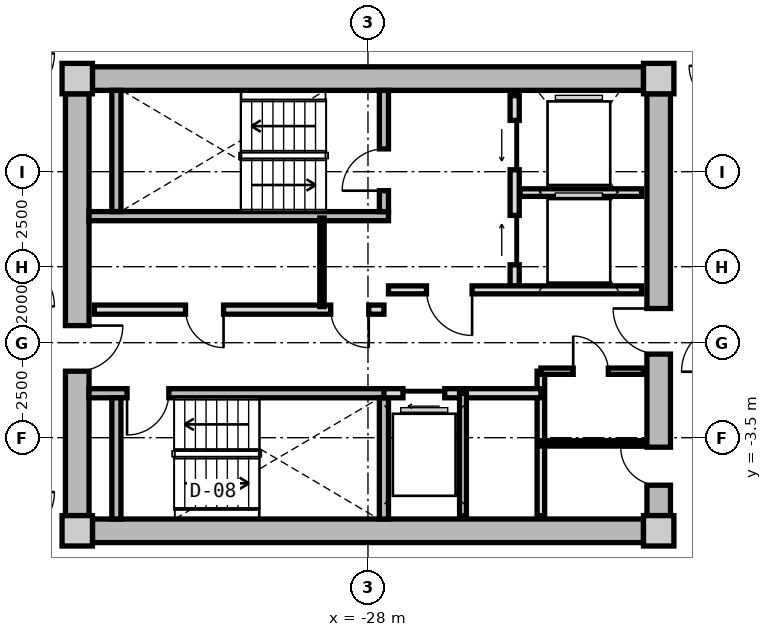
"""IFC4 building model, lengths in metres.
Left out: names, types, materials, properties, quantities, classifications, styles, units other than length and angle.
Written with IfcOpenShell. Run it as: python <this file> out.ifc"""

import sys

from ifc_helpers import new_model, si_unit, direction, frame, frame_2d, origin, origin_2d, place, context, subcontext, project, spatial, rectangle, extrude, source, transform, mapped, element, fill, save


model = new_model("IFC4")
c1 = context("Model", 3, precision=1e-05, world=origin(), true_north=direction((0.0, 1.0)))
c2 = subcontext(c1, "Body", "Model", "MODEL_VIEW")
j1 = project(units=[si_unit("LENGTHUNIT", "METRE"), si_unit("PLANEANGLEUNIT", "RADIAN")], contexts=[c1])
p1 = place(None, origin())
s1 = spatial("IfcSite", under=j1, at=p1, CompositionType="ELEMENT")
p2 = place(p1, origin())
s2 = spatial("IfcBuilding", under=s1, at=p2, CompositionType="ELEMENT")
p3 = place(p2, frame((0.0, 0.0, 152.6)))
s3 = spatial("IfcBuildingStorey", under=s2, at=p3, CompositionType="ELEMENT", Elevation=152.6)
m1 = source(origin(), c2, "Body", "SweptSolid", [
    extrude(rectangle(XDim=0.8, YDim=0.8, at=origin_2d()), origin(), (0.0, 0.0, 1.0), 3.05),
])
for number, where, z_axis, x_axis in (
    (1, (-35.65, -5.95, 0.0), (0.0, 0.0, 1.0), (1.0, 0.0, 0.0)),
    (2, (-20.35, -5.95, 0.0), (0.0, 0.0, 1.0), (1.0, 0.0, 0.0)),
    (3, (-20.35, 5.95, 0.0), (0.0, 0.0, 1.0), (1.0, 0.0, 0.0)),
    (4, (-35.65, 5.95, 0.0), (0.0, 0.0, 1.0), (1.0, 0.0, 0.0)),
):
    element("IfcColumn", number, at=place(p3, frame(where, z_axis=z_axis, x_axis=x_axis)), inside=s3, PredefinedType="COLUMN", context=c2, shape_type="MappedRepresentation", body=[
        mapped(m1, transform((0.0, 0.0, 0.0), x_axis=(1.0, 0.0, 0.0), y_axis=(0.0, 1.0, 0.0), z_axis=(0.0, 0.0, 1.0), scale=1.0)),
    ])
m2 = source(origin(), c2, "Body", "SweptSolid", [
    extrude(rectangle(XDim=14.5, YDim=0.62, at=frame_2d((7.25, 0.0))), origin(), (0.0, 0.0, 1.0), 2.81),
])
for number, where, z_axis, x_axis in (
    (5, (-35.25, 5.95, 0.0), (0.0, 0.0, 1.0), (1.0, 0.0, 0.0)),
    (6, (-20.75, -5.95, 0.0), (0.0, 0.0, 1.0), (-1.0, 0.0, 0.0)),
):
    element("IfcWall", number, at=place(p3, frame(where, z_axis=z_axis, x_axis=x_axis)), inside=s3, PredefinedType="SHEAR", context=c2, shape_type="MappedRepresentation", body=[
        mapped(m2, transform((0.0, 0.0, 0.0), x_axis=(1.0, 0.0, 0.0), y_axis=(0.0, 1.0, 0.0), z_axis=(0.0, 0.0, 1.0), scale=1.0)),
    ])
m3 = source(origin(), c2, "Body", "SweptSolid", [
    extrude(rectangle(XDim=11.1, YDim=0.62, at=frame_2d((5.55, 0.0))), origin(), (0.0, 0.0, 1.0), 2.81),
])
p4 = place(p3, frame((-35.65, -5.55, 0.0), z_axis=(0.0, 0.0, 1.0), x_axis=(0.0, 1.0, 0.0)))
e7 = element("IfcWall", 7, at=p4, inside=s3, PredefinedType="SHEAR", context=c2, shape_type="MappedRepresentation", body=[
    mapped(m3, transform((0.0, 0.0, 0.0), x_axis=(1.0, 0.0, 0.0), y_axis=(0.0, 1.0, 0.0), z_axis=(0.0, 0.0, 1.0), scale=1.0)),
])
p5 = place(p4, frame((3.8, 0.0, 0.0)))
e8 = element("IfcOpeningElement", 8, at=p5, cuts=e7, PredefinedType="OPENING", context=c2, shape_type="SweptSolid", body=[
    extrude(rectangle(XDim=1.2, YDim=2.15, at=frame_2d((0.6, 1.075))), frame((0.0, 0.32, 0.0), z_axis=(0.0, -1.0, 0.0), x_axis=(1.0, 0.0, 0.0)), (0.0, 0.0, 1.0), 0.64),
])
p6 = place(p3, frame((-20.35, 5.55, 0.0), z_axis=(0.0, 0.0, 1.0), x_axis=(0.0, -1.0, 0.0)))
e9 = element("IfcWall", 9, at=p6, inside=s3, PredefinedType="SHEAR", context=c2, shape_type="MappedRepresentation", body=[
    mapped(m3, transform((0.0, 0.0, 0.0), x_axis=(1.0, 0.0, 0.0), y_axis=(0.0, 1.0, 0.0), z_axis=(0.0, 0.0, 1.0), scale=1.0)),
])
p7 = place(p6, frame((5.65, 0.0, 0.0)))
e10 = element("IfcOpeningElement", 10, at=p7, cuts=e9, PredefinedType="OPENING", context=c2, shape_type="SweptSolid", body=[
    extrude(rectangle(XDim=1.2, YDim=2.15, at=frame_2d((0.6, 1.075))), frame((0.0, 0.32, 0.0), z_axis=(0.0, -1.0, 0.0), x_axis=(1.0, 0.0, 0.0)), (0.0, 0.0, 1.0), 0.64),
])
p8 = place(p6, frame((9.3, 0.0, 0.0)))
e11 = element("IfcOpeningElement", 11, at=p8, cuts=e9, PredefinedType="OPENING", context=c2, shape_type="SweptSolid", body=[
    extrude(rectangle(XDim=1.0, YDim=2.1, at=frame_2d((0.5, 1.05))), frame((0.0, 0.32, 0.0), z_axis=(0.0, -1.0, 0.0), x_axis=(1.0, 0.0, 0.0)), (0.0, 0.0, 1.0), 0.64),
])
m4 = source(origin(), c2, "Body", "SweptSolid", [
    extrude(rectangle(XDim=7.88, YDim=0.24, at=frame_2d((3.94, 0.0))), origin(), (0.0, 0.0, 1.0), 2.81),
])
p9 = place(p3, frame((-35.34, 2.33, 0.0), z_axis=(0.0, 0.0, 1.0), x_axis=(1.0, 0.0, 0.0)))
e12 = element("IfcWall", 12, at=p9, inside=s3, PredefinedType="PARTITIONING", context=c2, shape_type="MappedRepresentation", body=[
    mapped(m4, transform((0.0, 0.0, 0.0), x_axis=(1.0, 0.0, 0.0), y_axis=(0.0, 1.0, 0.0), z_axis=(0.0, 0.0, 1.0), scale=1.0)),
])
m5 = source(origin(), c2, "Body", "SweptSolid", [
    extrude(rectangle(XDim=3.19, YDim=0.24, at=frame_2d((1.595, 0.0))), origin(), (0.0, 0.0, 1.0), 2.81),
])
p10 = place(p3, frame((-34.62, 2.45, 0.0), z_axis=(0.0, 0.0, 1.0), x_axis=(0.0, 1.0, 0.0)))
e13 = element("IfcWall", 13, at=p10, inside=s3, PredefinedType="PARTITIONING", context=c2, shape_type="MappedRepresentation", body=[
    mapped(m5, transform((0.0, 0.0, 0.0), x_axis=(1.0, 0.0, 0.0), y_axis=(0.0, 1.0, 0.0), z_axis=(0.0, 0.0, 1.0), scale=1.0)),
])
p11 = place(p3, frame((-27.58, 2.45, 0.0), z_axis=(0.0, 0.0, 1.0), x_axis=(0.0, 1.0, 0.0)))
e14 = element("IfcWall", 14, at=p11, inside=s3, PredefinedType="PARTITIONING", context=c2, shape_type="MappedRepresentation", body=[
    mapped(m5, transform((0.0, 0.0, 0.0), x_axis=(1.0, 0.0, 0.0), y_axis=(0.0, 1.0, 0.0), z_axis=(0.0, 0.0, 1.0), scale=1.0)),
])
p12 = place(p11, frame((0.55, 0.0, 0.0)))
e15 = element("IfcOpeningElement", 15, at=p12, cuts=e14, PredefinedType="OPENING", context=c2, shape_type="SweptSolid", body=[
    extrude(rectangle(XDim=1.1, YDim=2.15, at=frame_2d((0.55, 1.075))), frame((0.0, 0.13, 0.0), z_axis=(0.0, -1.0, 0.0), x_axis=(1.0, 0.0, 0.0)), (0.0, 0.0, 1.0), 0.26),
])
p13 = place(p3, frame((-35.34, -2.33, 0.0), z_axis=(0.0, 0.0, 1.0), x_axis=(1.0, 0.0, 0.0)))
e16 = element("IfcWall", 16, at=p13, inside=s3, PredefinedType="PARTITIONING", context=c2, shape_type="MappedRepresentation", body=[
    mapped(m4, transform((0.0, 0.0, 0.0), x_axis=(1.0, 0.0, 0.0), y_axis=(0.0, 1.0, 0.0), z_axis=(0.0, 0.0, 1.0), scale=1.0)),
])
p14 = place(p13, frame((1.0, 0.0, 0.0)))
e17 = element("IfcOpeningElement", 17, at=p14, cuts=e16, PredefinedType="OPENING", context=c2, shape_type="SweptSolid", body=[
    extrude(rectangle(XDim=1.1, YDim=2.15, at=frame_2d((0.55, 1.075))), frame((0.0, 0.13, 0.0), z_axis=(0.0, -1.0, 0.0), x_axis=(1.0, 0.0, 0.0)), (0.0, 0.0, 1.0), 0.26),
])
for number, where, z_axis, x_axis in (
    (18, (-34.62, -5.64, 0.0), (0.0, 0.0, 1.0), (0.0, 1.0, 0.0)),
    (19, (-27.58, -5.64, 0.0), (0.0, 0.0, 1.0), (0.0, 1.0, 0.0)),
):
    element("IfcWall", number, at=place(p3, frame(where, z_axis=z_axis, x_axis=x_axis)), inside=s3, PredefinedType="PARTITIONING", context=c2, shape_type="MappedRepresentation", body=[
        mapped(m5, transform((0.0, 0.0, 0.0), x_axis=(1.0, 0.0, 0.0), y_axis=(0.0, 1.0, 0.0), z_axis=(0.0, 0.0, 1.0), scale=1.0)),
    ])
m6 = source(origin(), c2, "Body", "SweptSolid", [
    extrude(rectangle(XDim=5.0, YDim=0.24, at=frame_2d((2.5, 0.0))), origin(), (0.0, 0.0, 1.0), 2.795),
])
p15 = place(p3, frame((-24.14, 0.5, 0.0), z_axis=(0.0, 0.0, 1.0), x_axis=(0.0, 1.0, 0.0)))
e20 = element("IfcWall", 20, at=p15, inside=s3, PredefinedType="PARTITIONING", context=c2, shape_type="MappedRepresentation", body=[
    mapped(m6, transform((0.0, 0.0, 0.0), x_axis=(1.0, 0.0, 0.0), y_axis=(0.0, 1.0, 0.0), z_axis=(0.0, 0.0, 1.0), scale=1.0)),
])
p16 = place(p15, frame((3.05, 0.0, 0.0)))
e21 = element("IfcOpeningElement", 21, at=p16, cuts=e20, PredefinedType="OPENING", context=c2, shape_type="SweptSolid", body=[
    extrude(rectangle(XDim=1.3, YDim=2.2, at=frame_2d((0.65, 1.1))), frame((0.0, 0.13, 0.0), z_axis=(0.0, -1.0, 0.0), x_axis=(1.0, 0.0, 0.0)), (0.0, 0.0, 1.0), 0.26),
])
p17 = place(p15, frame((0.55, 0.0, 0.0)))
e22 = element("IfcOpeningElement", 22, at=p17, cuts=e20, PredefinedType="OPENING", context=c2, shape_type="SweptSolid", body=[
    extrude(rectangle(XDim=1.3, YDim=2.2, at=frame_2d((0.65, 1.1))), frame((0.0, 0.13, 0.0), z_axis=(0.0, -1.0, 0.0), x_axis=(1.0, 0.0, 0.0)), (0.0, 0.0, 1.0), 0.26),
])
m7 = source(origin(), c2, "Body", "SweptSolid", [
    extrude(rectangle(XDim=3.2, YDim=0.2, at=frame_2d((1.6, 0.0))), origin(), (0.0, 0.0, 1.0), 2.795),
])
p18 = place(p3, frame((-24.0, 2.95, 0.0), z_axis=(0.0, 0.0, 1.0), x_axis=(1.0, 0.0, 0.0)))
e23 = element("IfcWall", 23, at=p18, inside=s3, PredefinedType="PARTITIONING", context=c2, shape_type="MappedRepresentation", body=[
    mapped(m7, transform((0.0, 0.0, 0.0), x_axis=(1.0, 0.0, 0.0), y_axis=(0.0, 1.0, 0.0), z_axis=(0.0, 0.0, 1.0), scale=1.0)),
])
m8 = source(origin(), c2, "Body", "SweptSolid", [
    extrude(rectangle(XDim=6.66, YDim=0.21, at=frame_2d((3.33, 0.0))), origin(), (0.0, 0.0, 1.0), 2.795),
])
p19 = place(p3, frame((-27.46, 0.39, 0.0), z_axis=(0.0, 0.0, 1.0), x_axis=(1.0, 0.0, 0.0)))
e24 = element("IfcWall", 24, at=p19, inside=s3, PredefinedType="PARTITIONING", context=c2, shape_type="MappedRepresentation", body=[
    mapped(m8, transform((0.0, 0.0, 0.0), x_axis=(1.0, 0.0, 0.0), y_axis=(0.0, 1.0, 0.0), z_axis=(0.0, 0.0, 1.0), scale=1.0)),
])
p20 = place(p19, frame((1.0, 0.0, 0.0)))
e25 = element("IfcOpeningElement", 25, at=p20, cuts=e24, PredefinedType="OPENING", context=c2, shape_type="SweptSolid", body=[
    extrude(rectangle(XDim=1.2, YDim=2.15, at=frame_2d((0.6, 1.075))), frame((0.0, 0.115, 0.0), z_axis=(0.0, -1.0, 0.0), x_axis=(1.0, 0.0, 0.0)), (0.0, 0.0, 1.0), 0.23),
])
m9 = source(origin(), c2, "Body", "SweptSolid", [
    extrude(rectangle(XDim=7.62, YDim=0.24, at=frame_2d((3.81, 0.0))), origin(), (0.0, 0.0, 1.0), 2.795),
])
p21 = place(p3, frame((-35.2, -0.13, 0.0), z_axis=(0.0, 0.0, 1.0), x_axis=(1.0, 0.0, 0.0)))
e26 = element("IfcWall", 26, at=p21, inside=s3, PredefinedType="PARTITIONING", context=c2, shape_type="MappedRepresentation", body=[
    mapped(m9, transform((0.0, 0.0, 0.0), x_axis=(1.0, 0.0, 0.0), y_axis=(0.0, 1.0, 0.0), z_axis=(0.0, 0.0, 1.0), scale=1.0)),
])
p22 = place(p21, frame((6.22, 0.0, 0.0)))
e27 = element("IfcOpeningElement", 27, at=p22, cuts=e26, PredefinedType="OPENING", context=c2, shape_type="SweptSolid", body=[
    extrude(rectangle(XDim=1.0, YDim=2.1, at=frame_2d((0.5, 1.05))), frame((0.0, 0.13, 0.0), z_axis=(0.0, -1.0, 0.0), x_axis=(1.0, 0.0, 0.0)), (0.0, 0.0, 1.0), 0.26),
])
p23 = place(p21, frame((2.4, 0.0, 0.0)))
e28 = element("IfcOpeningElement", 28, at=p23, cuts=e26, PredefinedType="OPENING", context=c2, shape_type="SweptSolid", body=[
    extrude(rectangle(XDim=1.0, YDim=2.1, at=frame_2d((0.5, 1.05))), frame((0.0, 0.13, 0.0), z_axis=(0.0, -1.0, 0.0), x_axis=(1.0, 0.0, 0.0)), (0.0, 0.0, 1.0), 0.26),
])
m10 = source(origin(), c2, "Body", "SweptSolid", [
    extrude(rectangle(XDim=2.33, YDim=0.115, at=frame_2d((1.165, 0.0))), origin(), (0.0, 0.0, 1.0), 2.795),
])
p24 = place(p3, frame((-29.21, -0.05, 0.0), z_axis=(0.0, 0.0, 1.0), x_axis=(0.0, 1.0, 0.0)))
e29 = element("IfcWall", 29, at=p24, inside=s3, PredefinedType="PARTITIONING", context=c2, shape_type="MappedRepresentation", body=[
    mapped(m10, transform((0.0, 0.0, 0.0), x_axis=(1.0, 0.0, 0.0), y_axis=(0.0, 1.0, 0.0), z_axis=(0.0, 0.0, 1.0), scale=1.0)),
])
m11 = source(origin(), c2, "Body", "SweptSolid", [
    extrude(rectangle(XDim=3.8, YDim=0.2, at=frame_2d((1.9, 0.0))), origin(), (0.0, 0.0, 1.0), 2.795),
])
p25 = place(p3, frame((-23.45, -5.55, 0.0), z_axis=(0.0, 0.0, 1.0), x_axis=(0.0, 1.0, 0.0)))
e30 = element("IfcWall", 30, at=p25, inside=s3, PredefinedType="PARTITIONING", context=c2, shape_type="MappedRepresentation", body=[
    mapped(m11, transform((0.0, 0.0, 0.0), x_axis=(1.0, 0.0, 0.0), y_axis=(0.0, 1.0, 0.0), z_axis=(0.0, 0.0, 1.0), scale=1.0)),
])
m12 = source(origin(), c2, "Body", "SweptSolid", [
    extrude(rectangle(XDim=4.13, YDim=0.24, at=frame_2d((2.065, 0.0))), origin(), (0.0, 0.0, 1.0), 2.795),
])
p26 = place(p3, frame((-27.58, -2.33, 0.0), z_axis=(0.0, 0.0, 1.0), x_axis=(1.0, 0.0, 0.0)))
e31 = element("IfcWall", 31, at=p26, inside=s3, PredefinedType="PARTITIONING", context=c2, shape_type="MappedRepresentation", body=[
    mapped(m12, transform((0.0, 0.0, 0.0), x_axis=(1.0, 0.0, 0.0), y_axis=(0.0, 1.0, 0.0), z_axis=(0.0, 0.0, 1.0), scale=1.0)),
])
p27 = place(p26, frame((0.5, 0.0, 0.0)))
e32 = element("IfcOpeningElement", 32, at=p27, cuts=e31, PredefinedType="OPENING", context=c2, shape_type="SweptSolid", body=[
    extrude(rectangle(XDim=1.1, YDim=2.2, at=frame_2d((0.55, 1.1))), frame((0.0, 0.13, 0.0), z_axis=(0.0, -1.0, 0.0), x_axis=(1.0, 0.0, 0.0)), (0.0, 0.0, 1.0), 0.26),
])
m13 = source(origin(), c2, "Body", "SweptSolid", [
    extrude(rectangle(XDim=3.22, YDim=0.18, at=frame_2d((1.61, 0.0))), origin(), (0.0, 0.0, 1.0), 2.795),
])
p28 = place(p3, frame((-25.5, -5.55, 0.0), z_axis=(0.0, 0.0, 1.0), x_axis=(0.0, 1.0, 0.0)))
e33 = element("IfcWall", 33, at=p28, inside=s3, PredefinedType="PARTITIONING", context=c2, shape_type="MappedRepresentation", body=[
    mapped(m13, transform((0.0, 0.0, 0.0), x_axis=(1.0, 0.0, 0.0), y_axis=(0.0, 1.0, 0.0), z_axis=(0.0, 0.0, 1.0), scale=1.0)),
])
m14 = source(origin(), c2, "Body", "SweptSolid", [
    extrude(rectangle(XDim=2.7, YDim=0.165, at=frame_2d((1.35, 0.0))), origin(), (0.0, 0.0, 1.0), 2.795),
])
p29 = place(p3, frame((-23.45, -1.75, 0.0), z_axis=(0.0, 0.0, 1.0), x_axis=(1.0, 0.0, 0.0)))
e34 = element("IfcWall", 34, at=p29, inside=s3, PredefinedType="PARTITIONING", context=c2, shape_type="MappedRepresentation", body=[
    mapped(m14, transform((0.0, 0.0, 0.0), x_axis=(1.0, 0.0, 0.0), y_axis=(0.0, 1.0, 0.0), z_axis=(0.0, 0.0, 1.0), scale=1.0)),
])
p30 = place(p29, frame((0.85, 0.0, 0.0)))
e35 = element("IfcOpeningElement", 35, at=p30, cuts=e34, PredefinedType="OPENING", context=c2, shape_type="SweptSolid", body=[
    extrude(rectangle(XDim=0.925, YDim=2.1, at=frame_2d((0.462, 1.05))), frame((0.0, 0.093, 0.0), z_axis=(0.0, -1.0, 0.0), x_axis=(1.0, 0.0, 0.0)), (0.0, 0.0, 1.0), 0.185),
])
m15 = source(origin(), c2, "Body", "SweptSolid", [
    extrude(rectangle(XDim=2.7, YDim=0.14, at=frame_2d((1.35, 0.0))), origin(), (0.0, 0.0, 1.0), 2.795),
])
p31 = place(p3, frame((-23.45, -3.65, 0.0), z_axis=(0.0, 0.0, 1.0), x_axis=(1.0, 0.0, 0.0)))
e36 = element("IfcWall", 36, at=p31, inside=s3, PredefinedType="PARTITIONING", context=c2, shape_type="MappedRepresentation", body=[
    mapped(m15, transform((0.0, 0.0, 0.0), x_axis=(1.0, 0.0, 0.0), y_axis=(0.0, 1.0, 0.0), z_axis=(0.0, 0.0, 1.0), scale=1.0)),
])
m16 = source(origin(), c2, "Body", "SweptSolid", [
    extrude(rectangle(XDim=1.1, YDim=2.15, at=frame_2d((0.55, 1.075))), frame((0.0, 0.025, 0.0), z_axis=(0.0, -1.0, 0.0), x_axis=(1.0, 0.0, 0.0)), (0.0, 0.0, 1.0), 0.05),
])
p32 = place(p12, origin())
e37 = element("IfcDoor", 37, at=p32, inside=s3, OperationType="SINGLE_SWING_LEFT", PredefinedType="DOOR", context=c2, shape_type="MappedRepresentation", body=[
    mapped(m16, transform((0.0, 0.0, 0.0), x_axis=(1.0, 0.0, 0.0), y_axis=(0.0, 1.0, 0.0), z_axis=(0.0, 0.0, 1.0), scale=1.0)),
])
fill(e15, e37)
p33 = place(p14, frame((1.1, 0.0, 0.0), z_axis=(0.0, 0.0, 1.0), x_axis=(-1.0, 0.0, 0.0)))
e38 = element("IfcDoor", 38, at=p33, inside=s3, OperationType="SINGLE_SWING_RIGHT", PredefinedType="DOOR", context=c2, shape_type="MappedRepresentation", body=[
    mapped(m16, transform((0.0, 0.0, 0.0), x_axis=(1.0, 0.0, 0.0), y_axis=(0.0, 1.0, 0.0), z_axis=(0.0, 0.0, 1.0), scale=1.0)),
])
fill(e17, e38)
m17 = source(origin(), c2, "Body", "SweptSolid", [
    extrude(rectangle(XDim=1.3, YDim=2.2, at=frame_2d((0.65, 1.1))), frame((0.0, 0.025, 0.0), z_axis=(0.0, -1.0, 0.0), x_axis=(1.0, 0.0, 0.0)), (0.0, 0.0, 1.0), 0.05),
])
p34 = place(p16, origin())
e39 = element("IfcDoor", 39, at=p34, inside=s3, OperationType="SLIDING_TO_LEFT", PredefinedType="DOOR", context=c2, shape_type="MappedRepresentation", body=[
    mapped(m17, transform((0.0, 0.0, 0.0), x_axis=(1.0, 0.0, 0.0), y_axis=(0.0, 1.0, 0.0), z_axis=(0.0, 0.0, 1.0), scale=1.0)),
])
fill(e21, e39)
p35 = place(p17, origin())
e40 = element("IfcDoor", 40, at=p35, inside=s3, OperationType="SLIDING_TO_RIGHT", PredefinedType="DOOR", context=c2, shape_type="MappedRepresentation", body=[
    mapped(m17, transform((0.0, 0.0, 0.0), x_axis=(1.0, 0.0, 0.0), y_axis=(0.0, 1.0, 0.0), z_axis=(0.0, 0.0, 1.0), scale=1.0)),
])
fill(e22, e40)
m18 = source(origin(), c2, "Body", "SweptSolid", [
    extrude(rectangle(XDim=1.2, YDim=2.15, at=frame_2d((0.6, 1.075))), frame((0.0, 0.025, 0.0), z_axis=(0.0, -1.0, 0.0), x_axis=(1.0, 0.0, 0.0)), (0.0, 0.0, 1.0), 0.05),
])
p36 = place(p20, frame((1.2, 0.0, 0.0), z_axis=(0.0, 0.0, 1.0), x_axis=(-1.0, 0.0, 0.0)))
e41 = element("IfcDoor", 41, at=p36, inside=s3, OperationType="SINGLE_SWING_LEFT", PredefinedType="DOOR", context=c2, shape_type="MappedRepresentation", body=[
    mapped(m18, transform((0.0, 0.0, 0.0), x_axis=(1.0, 0.0, 0.0), y_axis=(0.0, 1.0, 0.0), z_axis=(0.0, 0.0, 1.0), scale=1.0)),
])
fill(e25, e41)
p37 = place(p5, frame((1.2, 0.0, 0.0), z_axis=(0.0, 0.0, 1.0), x_axis=(-1.0, 0.0, 0.0)))
e42 = element("IfcDoor", 42, at=p37, inside=s3, OperationType="SINGLE_SWING_LEFT", PredefinedType="DOOR", context=c2, shape_type="MappedRepresentation", body=[
    mapped(m18, transform((0.0, 0.0, 0.0), x_axis=(1.0, 0.0, 0.0), y_axis=(0.0, 1.0, 0.0), z_axis=(0.0, 0.0, 1.0), scale=1.0)),
])
fill(e8, e42)
p38 = place(p7, frame((1.2, 0.0, 0.0), z_axis=(0.0, 0.0, 1.0), x_axis=(-1.0, 0.0, 0.0)))
e43 = element("IfcDoor", 43, at=p38, inside=s3, OperationType="SINGLE_SWING_RIGHT", PredefinedType="DOOR", context=c2, shape_type="MappedRepresentation", body=[
    mapped(m18, transform((0.0, 0.0, 0.0), x_axis=(1.0, 0.0, 0.0), y_axis=(0.0, 1.0, 0.0), z_axis=(0.0, 0.0, 1.0), scale=1.0)),
])
fill(e10, e43)
m19 = source(origin(), c2, "Body", "SweptSolid", [
    extrude(rectangle(XDim=1.0, YDim=2.1, at=frame_2d((0.5, 1.05))), frame((0.0, 0.025, 0.0), z_axis=(0.0, -1.0, 0.0), x_axis=(1.0, 0.0, 0.0)), (0.0, 0.0, 1.0), 0.05),
])
p39 = place(p22, frame((1.0, 0.0, 0.0), z_axis=(0.0, 0.0, 1.0), x_axis=(-1.0, 0.0, 0.0)))
e44 = element("IfcDoor", 44, at=p39, inside=s3, OperationType="SINGLE_SWING_LEFT", PredefinedType="DOOR", context=c2, shape_type="MappedRepresentation", body=[
    mapped(m19, transform((0.0, 0.0, 0.0), x_axis=(1.0, 0.0, 0.0), y_axis=(0.0, 1.0, 0.0), z_axis=(0.0, 0.0, 1.0), scale=1.0)),
])
fill(e27, e44)
p40 = place(p23, frame((1.0, 0.0, 0.0), z_axis=(0.0, 0.0, 1.0), x_axis=(-1.0, 0.0, 0.0)))
e45 = element("IfcDoor", 45, at=p40, inside=s3, OperationType="SINGLE_SWING_LEFT", PredefinedType="DOOR", context=c2, shape_type="MappedRepresentation", body=[
    mapped(m19, transform((0.0, 0.0, 0.0), x_axis=(1.0, 0.0, 0.0), y_axis=(0.0, 1.0, 0.0), z_axis=(0.0, 0.0, 1.0), scale=1.0)),
])
fill(e28, e45)
m20 = source(origin(), c2, "Body", "SweptSolid", [
    extrude(rectangle(XDim=1.1, YDim=2.2, at=frame_2d((0.55, 1.1))), frame((0.0, 0.025, 0.0), z_axis=(0.0, -1.0, 0.0), x_axis=(1.0, 0.0, 0.0)), (0.0, 0.0, 1.0), 0.05),
])
p41 = place(p27, frame((1.1, 0.0, 0.0), z_axis=(0.0, 0.0, 1.0), x_axis=(-1.0, 0.0, 0.0)))
e46 = element("IfcDoor", 46, at=p41, inside=s3, OperationType="SLIDING_TO_LEFT", PredefinedType="DOOR", context=c2, shape_type="MappedRepresentation", body=[
    mapped(m20, transform((0.0, 0.0, 0.0), x_axis=(1.0, 0.0, 0.0), y_axis=(0.0, 1.0, 0.0), z_axis=(0.0, 0.0, 1.0), scale=1.0)),
])
fill(e32, e46)
m21 = source(origin(), c2, "Body", "SweptSolid", [
    extrude(rectangle(XDim=0.925, YDim=2.1, at=frame_2d((0.462, 1.05))), frame((0.0, 0.025, 0.0), z_axis=(0.0, -1.0, 0.0), x_axis=(1.0, 0.0, 0.0)), (0.0, 0.0, 1.0), 0.05),
])
p42 = place(p30, origin())
e47 = element("IfcDoor", 47, at=p42, inside=s3, OperationType="SINGLE_SWING_LEFT", PredefinedType="DOOR", context=c2, shape_type="MappedRepresentation", body=[
    mapped(m21, transform((0.0, 0.0, 0.0), x_axis=(1.0, 0.0, 0.0), y_axis=(0.0, 1.0, 0.0), z_axis=(0.0, 0.0, 1.0), scale=1.0)),
])
fill(e35, e47)
p43 = place(p8, frame((1.0, 0.0, 0.0), z_axis=(0.0, 0.0, 1.0), x_axis=(-1.0, 0.0, 0.0)))
e48 = element("IfcDoor", 48, at=p43, inside=s3, OperationType="SINGLE_SWING_RIGHT", PredefinedType="DOOR", context=c2, shape_type="MappedRepresentation", body=[
    mapped(m19, transform((0.0, 0.0, 0.0), x_axis=(1.0, 0.0, 0.0), y_axis=(0.0, 1.0, 0.0), z_axis=(0.0, 0.0, 1.0), scale=1.0)),
])
fill(e11, e48)
save(model, sys.argv[1])
